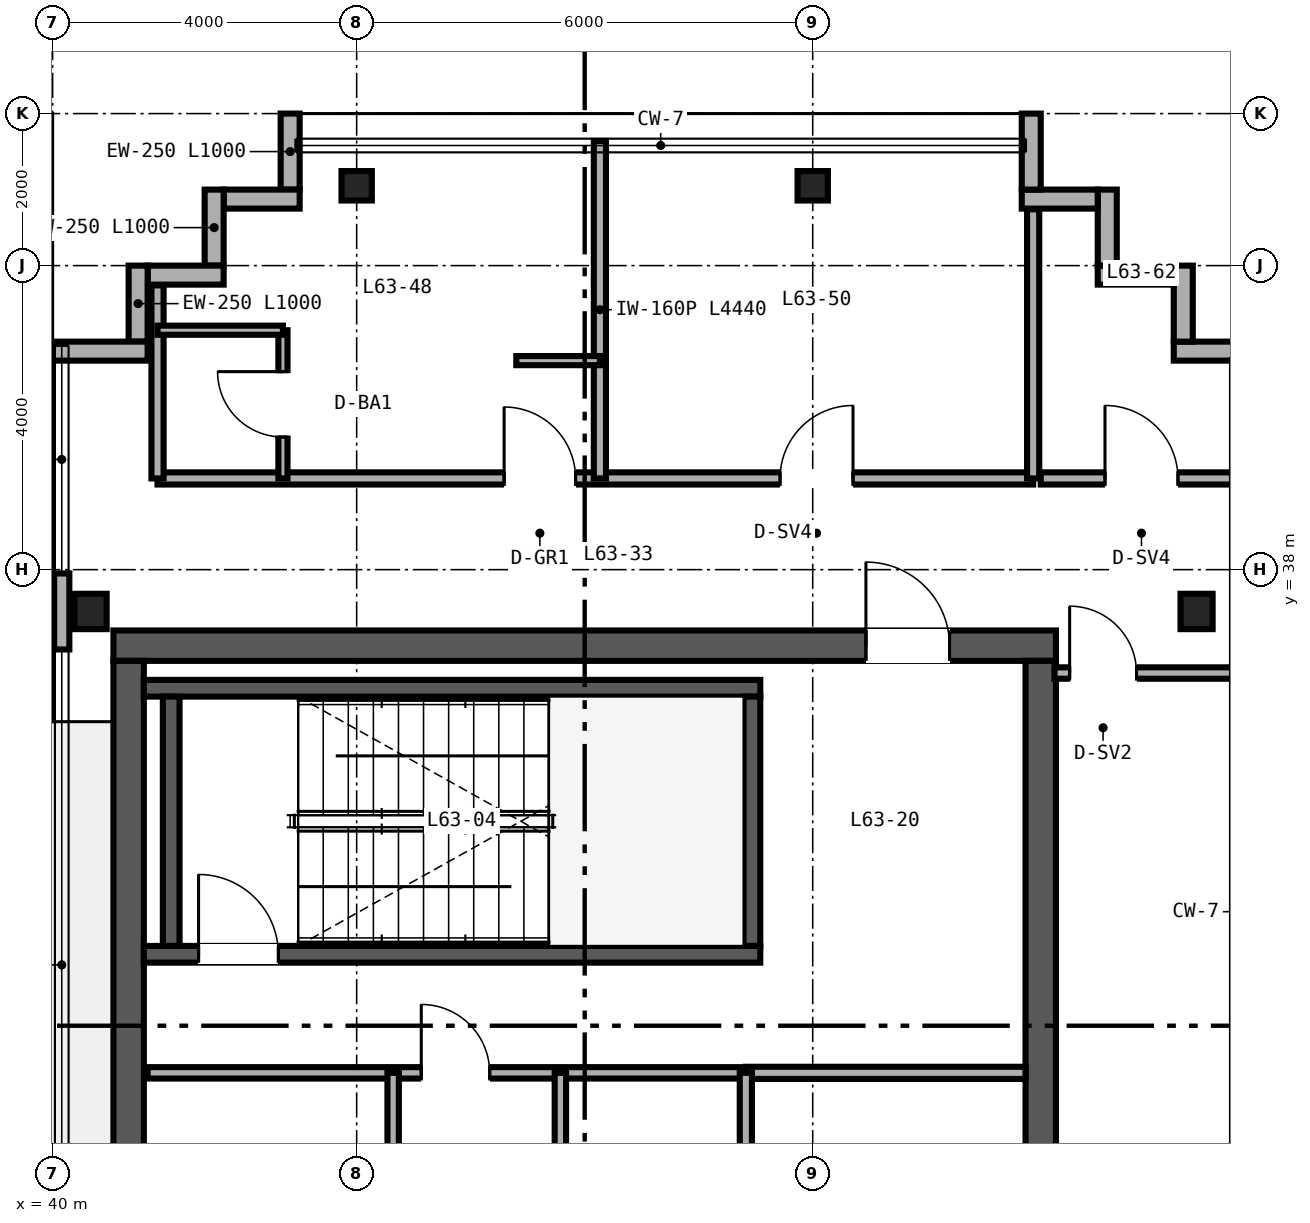
"""IFC4 building model, lengths in metres.
Left out: names, types, materials, properties, quantities, classifications, styles, units other than length and angle.
Written with IfcOpenShell. Run it as: python <this file> out.ifc"""

import sys

from ifc_helpers import new_model, si_unit, direction, frame, frame_2d, origin, origin_2d, place, context, subcontext, project, spatial, rectangle, i_section, extrude, source, transform, mapped, element, fill, save


model = new_model("IFC4")
c1 = context("Model", 3, precision=1e-05, world=origin(), true_north=direction((0.0, 1.0)))
c2 = subcontext(c1, "Body", "Model", "MODEL_VIEW")
j1 = project(units=[si_unit("LENGTHUNIT", "METRE"), si_unit("PLANEANGLEUNIT", "RADIAN")], contexts=[c1])
p1 = place(None, origin())
s1 = spatial("IfcSite", under=j1, at=p1, CompositionType="ELEMENT")
p2 = place(p1, origin())
s2 = spatial("IfcBuilding", under=s1, at=p2, CompositionType="ELEMENT")
p3 = place(p2, frame((0.0, 0.0, 250.8)))
s3 = spatial("IfcBuildingStorey", under=s2, at=p3, CompositionType="ELEMENT", Elevation=250.8)
p4 = place(p3, frame((40.8, 37.0, 0.0), z_axis=(0.0, 0.0, 1.0), x_axis=(1.0, 0.0, 0.0)))
e1 = element("IfcWall", 1, at=p4, inside=s3, PredefinedType="SHEAR", context=c2, shape_type="SweptSolid", body=[
    extrude(rectangle(XDim=12.4, YDim=0.4, at=frame_2d((6.2, 0.0))), origin(), (0.0, 0.0, 1.0), 3.38),
])
p5 = place(p4, frame((9.9, 0.0, 0.0)))
e2 = element("IfcOpeningElement", 2, at=p5, cuts=e1, PredefinedType="OPENING", context=c2, shape_type="SweptSolid", body=[
    extrude(rectangle(XDim=1.1, YDim=2.15, at=frame_2d((0.55, 1.075))), frame((0.0, 0.21, 0.0), z_axis=(0.0, -1.0, 0.0), x_axis=(1.0, 0.0, 0.0)), (0.0, 0.0, 1.0), 0.42),
])
for number, where, z_axis, x_axis in (
    (3, (41.0, 15.2, 0.0), (0.0, 0.0, 1.0), (0.0, 1.0, 0.0)),
    (4, (53.0, 15.2, 0.0), (0.0, 0.0, 1.0), (0.0, 1.0, 0.0)),
):
    element("IfcWall", number, at=place(p3, frame(where, z_axis=z_axis, x_axis=x_axis)), inside=s3, PredefinedType="SHEAR", context=c2, shape_type="SweptSolid", body=[
        extrude(rectangle(XDim=21.6, YDim=0.4, at=frame_2d((10.8, 0.0))), origin(), (0.0, 0.0, 1.0), 3.38),
    ])
p6 = place(p3, frame((41.2, 32.94, 0.0), z_axis=(0.0, 0.0, 1.0), x_axis=(1.0, 0.0, 0.0)))
e5 = element("IfcWall", 5, at=p6, inside=s3, PredefinedType="SHEAR", context=c2, shape_type="SweptSolid", body=[
    extrude(rectangle(XDim=8.11, YDim=0.22, at=frame_2d((4.055, 0.0))), origin(), (0.0, 0.0, 1.0), 3.4),
])
p7 = place(p6, frame((0.72, 0.0, 0.0)))
e6 = element("IfcOpeningElement", 6, at=p7, cuts=e5, PredefinedType="OPENING", context=c2, shape_type="SweptSolid", body=[
    extrude(rectangle(XDim=1.05, YDim=2.15, at=frame_2d((0.525, 1.075))), frame((0.0, 0.12, 0.0), z_axis=(0.0, -1.0, 0.0), x_axis=(1.0, 0.0, 0.0)), (0.0, 0.0, 1.0), 0.24),
])
p8 = place(p3, frame((41.2, 36.44, 0.0), z_axis=(0.0, 0.0, 1.0), x_axis=(1.0, 0.0, 0.0)))
e7 = element("IfcWall", 7, at=p8, inside=s3, PredefinedType="SHEAR", context=c2, shape_type="SweptSolid", body=[
    extrude(rectangle(XDim=8.11, YDim=0.22, at=frame_2d((4.055, 0.0))), origin(), (0.0, 0.0, 1.0), 3.4),
])
for number, where, z_axis, x_axis in (
    (8, (41.56, 33.05, 0.0), (0.0, 0.0, 1.0), (0.0, 1.0, 0.0)),
    (9, (49.2, 33.05, 0.0), (0.0, 0.0, 1.0), (0.0, 1.0, 0.0)),
):
    element("IfcWall", number, at=place(p3, frame(where, z_axis=z_axis, x_axis=x_axis)), inside=s3, PredefinedType="SHEAR", context=c2, shape_type="SweptSolid", body=[
        extrude(rectangle(XDim=3.28, YDim=0.22, at=frame_2d((1.64, 0.0))), origin(), (0.0, 0.0, 1.0), 3.4),
    ])
m1 = source(origin(), c2, "Body", "SweptSolid", [
    extrude(i_section(OverallWidth=0.422, OverallDepth=0.465, WebThickness=0.045, FlangeThickness=0.073, FilletRadius=0.025, at=origin_2d()), origin(), (0.0, 0.0, 1.0), 3.38),
])
for number, where, z_axis, x_axis in (
    (10, (40.5, 37.45, 0.0), (0.0, 0.0, 1.0), (1.0, 0.0, 0.0)),
    (11, (55.05, 37.45, 0.0), (0.0, 0.0, 1.0), (1.0, 0.0, 0.0)),
):
    element("IfcColumn", number, at=place(p3, frame(where, z_axis=z_axis, x_axis=x_axis)), inside=s3, PredefinedType="COLUMN", context=c2, shape_type="MappedRepresentation", body=[
        mapped(m1, transform((0.0, 0.0, 0.0), scale=1.0)),
    ])
m2 = source(origin(), c2, "Body", "SweptSolid", [
    extrude(i_section(OverallWidth=0.399, OverallDepth=0.387, WebThickness=0.021, FlangeThickness=0.033, FilletRadius=0.025, at=origin_2d()), origin(), (0.0, 0.0, 1.0), 3.38),
])
for number, where, z_axis, x_axis in (
    (12, (44.0, 43.05, 0.0), (0.0, 0.0, 1.0), (1.0, 0.0, 0.0)),
    (13, (50.0, 43.05, 0.0), (0.0, 0.0, 1.0), (1.0, 0.0, 0.0)),
):
    element("IfcColumn", number, at=place(p3, frame(where, z_axis=z_axis, x_axis=x_axis)), inside=s3, PredefinedType="COLUMN", context=c2, shape_type="MappedRepresentation", body=[
        mapped(m2, transform((0.0, 0.0, 0.0), scale=1.0)),
    ])
p9 = place(p3, frame((56.0, 40.875, 0.0), z_axis=(0.0, 0.0, 1.0), x_axis=(-1.0, 0.0, 0.0)))
e14 = element("IfcWall", 14, at=p9, inside=s3, PredefinedType="SOLIDWALL", context=c2, shape_type="SweptSolid", body=[
    extrude(rectangle(XDim=1.25, YDim=0.25, at=frame_2d((0.625, 0.0))), origin(), (0.0, 0.0, 1.0), 3.38),
])
for number, where, z_axis, x_axis in (
    (15, (54.875, 41.0, 0.0), (0.0, 0.0, 1.0), (0.0, 1.0, 0.0)),
    (16, (54.75, 41.875, 0.0), (0.0, 0.0, 1.0), (-1.0, 0.0, 0.0)),
    (17, (53.875, 42.0, 0.0), (0.0, 0.0, 1.0), (0.0, 1.0, 0.0)),
    (18, (53.75, 42.875, 0.0), (0.0, 0.0, 1.0), (-1.0, 0.0, 0.0)),
    (19, (52.875, 43.0, 0.0), (0.0, 0.0, 1.0), (0.0, 1.0, 0.0)),
    (20, (43.125, 44.0, 0.0), (0.0, 0.0, 1.0), (0.0, -1.0, 0.0)),
    (21, (43.25, 42.875, 0.0), (0.0, 0.0, 1.0), (-1.0, 0.0, 0.0)),
    (22, (42.125, 43.0, 0.0), (0.0, 0.0, 1.0), (0.0, -1.0, 0.0)),
    (23, (42.25, 41.875, 0.0), (0.0, 0.0, 1.0), (-1.0, 0.0, 0.0)),
    (24, (41.125, 42.0, 0.0), (0.0, 0.0, 1.0), (0.0, -1.0, 0.0)),
):
    element("IfcWall", number, at=place(p3, frame(where, z_axis=z_axis, x_axis=x_axis)), inside=s3, PredefinedType="SOLIDWALL", context=c2, shape_type="SweptSolid", body=[
        extrude(rectangle(XDim=1.0, YDim=0.25, at=frame_2d((0.5, 0.0))), origin(), (0.0, 0.0, 1.0), 3.38),
    ])
p10 = place(p3, frame((41.25, 40.875, 0.0), z_axis=(0.0, 0.0, 1.0), x_axis=(-1.0, 0.0, 0.0)))
e25 = element("IfcWall", 25, at=p10, inside=s3, PredefinedType="SOLIDWALL", context=c2, shape_type="SweptSolid", body=[
    extrude(rectangle(XDim=1.25, YDim=0.25, at=frame_2d((0.625, 0.0))), origin(), (0.0, 0.0, 1.0), 3.38),
])
p11 = place(p3, frame((40.12, 36.95, 0.0), z_axis=(0.0, 0.0, 1.0), x_axis=(0.0, 1.0, 0.0)))
e26 = element("IfcWall", 26, at=p11, inside=s3, PredefinedType="PARAPET", context=c2, shape_type="SweptSolid", body=[
    extrude(rectangle(XDim=1.0, YDim=0.2, at=frame_2d((0.5, 0.0))), origin(), (0.0, 0.0, 1.0), 3.38),
])
p12 = place(p3, frame((41.25, 31.38, 0.0), z_axis=(0.0, 0.0, 1.0), x_axis=(1.0, 0.0, 0.0)))
e27 = element("IfcWall", 27, at=p12, inside=s3, PredefinedType="PARTITIONING", context=c2, shape_type="SweptSolid", body=[
    extrude(rectangle(XDim=7.87, YDim=0.15, at=frame_2d((3.935, 0.0))), origin(), (0.0, 0.0, 1.0), 2.48),
])
p13 = place(p12, frame((3.6, 0.0, 0.0)))
e28 = element("IfcOpeningElement", 28, at=p13, cuts=e27, PredefinedType="OPENING", context=c2, shape_type="SweptSolid", body=[
    extrude(rectangle(XDim=0.9, YDim=2.15, at=frame_2d((0.45, 1.075))), frame((0.0, 0.085, 0.0), z_axis=(0.0, -1.0, 0.0), x_axis=(1.0, 0.0, 0.0)), (0.0, 0.0, 1.0), 0.17),
])
p14 = place(p3, frame((46.68, 15.25, 0.0), z_axis=(0.0, 0.0, 1.0), x_axis=(0.0, 1.0, 0.0)))
e29 = element("IfcWall", 29, at=p14, inside=s3, PredefinedType="PARTITIONING", context=c2, shape_type="SweptSolid", body=[
    extrude(rectangle(XDim=16.13, YDim=0.15, at=frame_2d((8.065, 0.0))), origin(), (0.0, 0.0, 1.0), 2.453),
])
p15 = place(p14, frame((2.0, 0.0, 0.0)))
e30 = element("IfcOpeningElement", 30, at=p15, cuts=e29, PredefinedType="OPENING", context=c2, shape_type="SweptSolid", body=[
    extrude(rectangle(XDim=0.84, YDim=2.1, at=frame_2d((0.42, 1.05))), frame((0.0, 0.085, 0.0), z_axis=(0.0, -1.0, 0.0), x_axis=(1.0, 0.0, 0.0)), (0.0, 0.0, 1.0), 0.17),
])
p16 = place(p14, frame((7.2, 0.0, 0.0)))
e31 = element("IfcOpeningElement", 31, at=p16, cuts=e29, PredefinedType="OPENING", context=c2, shape_type="SweptSolid", body=[
    extrude(rectangle(XDim=0.84, YDim=2.1, at=frame_2d((0.42, 1.05))), frame((0.0, 0.085, 0.0), z_axis=(0.0, -1.0, 0.0), x_axis=(1.0, 0.0, 0.0)), (0.0, 0.0, 1.0), 0.17),
])
p17 = place(p14, frame((12.6, 0.0, 0.0)))
e32 = element("IfcOpeningElement", 32, at=p17, cuts=e29, PredefinedType="OPENING", context=c2, shape_type="SweptSolid", body=[
    extrude(rectangle(XDim=0.84, YDim=2.1, at=frame_2d((0.42, 1.05))), frame((0.0, 0.085, 0.0), z_axis=(0.0, -1.0, 0.0), x_axis=(1.0, 0.0, 0.0)), (0.0, 0.0, 1.0), 0.17),
])
p18 = place(p3, frame((49.12, 31.38, 0.0), z_axis=(0.0, 0.0, 1.0), x_axis=(1.0, 0.0, 0.0)))
e33 = element("IfcWall", 33, at=p18, inside=s3, PredefinedType="PARTITIONING", context=c2, shape_type="SweptSolid", body=[
    extrude(rectangle(XDim=3.68, YDim=0.16, at=frame_2d((1.84, 0.0))), origin(), (0.0, 0.0, 1.0), 2.48),
])
p19 = place(p3, frame((49.12, 15.25, 0.0), z_axis=(0.0, 0.0, 1.0), x_axis=(0.0, 1.0, 0.0)))
e34 = element("IfcWall", 34, at=p19, inside=s3, PredefinedType="PARTITIONING", context=c2, shape_type="SweptSolid", body=[
    extrude(rectangle(XDim=16.13, YDim=0.16, at=frame_2d((8.065, 0.0))), origin(), (0.0, 0.0, 1.0), 2.453),
])
p20 = place(p19, frame((3.8, 0.0, 0.0)))
e35 = element("IfcOpeningElement", 35, at=p20, cuts=e34, PredefinedType="OPENING", context=c2, shape_type="SweptSolid", body=[
    extrude(rectangle(XDim=0.92, YDim=2.15, at=frame_2d((0.46, 1.075))), frame((0.0, 0.09, 0.0), z_axis=(0.0, -1.0, 0.0), x_axis=(1.0, 0.0, 0.0)), (0.0, 0.0, 1.0), 0.18),
])
p21 = place(p19, frame((11.8, 0.0, 0.0)))
e36 = element("IfcOpeningElement", 36, at=p21, cuts=e34, PredefinedType="OPENING", context=c2, shape_type="SweptSolid", body=[
    extrude(rectangle(XDim=0.9, YDim=2.15, at=frame_2d((0.45, 1.075))), frame((0.0, 0.09, 0.0), z_axis=(0.0, -1.0, 0.0), x_axis=(1.0, 0.0, 0.0)), (0.0, 0.0, 1.0), 0.18),
])
p22 = place(p3, frame((44.48, 15.25, 0.0), z_axis=(0.0, 0.0, 1.0), x_axis=(0.0, 1.0, 0.0)))
e37 = element("IfcWall", 37, at=p22, inside=s3, PredefinedType="PARTITIONING", context=c2, shape_type="SweptSolid", body=[
    extrude(rectangle(XDim=16.13, YDim=0.15, at=frame_2d((8.065, 0.0))), origin(), (0.0, 0.0, 1.0), 2.453),
])
p23 = place(p22, frame((1.6, 0.0, 0.0)))
e38 = element("IfcOpeningElement", 38, at=p23, cuts=e37, PredefinedType="OPENING", context=c2, shape_type="SweptSolid", body=[
    extrude(rectangle(XDim=0.84, YDim=2.1, at=frame_2d((0.42, 1.05))), frame((0.0, 0.085, 0.0), z_axis=(0.0, -1.0, 0.0), x_axis=(1.0, 0.0, 0.0)), (0.0, 0.0, 1.0), 0.17),
])
p24 = place(p22, frame((5.85, 0.0, 0.0)))
e39 = element("IfcOpeningElement", 39, at=p24, cuts=e37, PredefinedType="OPENING", context=c2, shape_type="SweptSolid", body=[
    extrude(rectangle(XDim=0.84, YDim=2.1, at=frame_2d((0.42, 1.05))), frame((0.0, 0.085, 0.0), z_axis=(0.0, -1.0, 0.0), x_axis=(1.0, 0.0, 0.0)), (0.0, 0.0, 1.0), 0.17),
])
p25 = place(p22, frame((10.05, 0.0, 0.0)))
e40 = element("IfcOpeningElement", 40, at=p25, cuts=e37, PredefinedType="OPENING", context=c2, shape_type="SweptSolid", body=[
    extrude(rectangle(XDim=0.84, YDim=2.1, at=frame_2d((0.42, 1.05))), frame((0.0, 0.085, 0.0), z_axis=(0.0, -1.0, 0.0), x_axis=(1.0, 0.0, 0.0)), (0.0, 0.0, 1.0), 0.17),
])
p26 = place(p3, frame((41.38, 39.2, 0.0), z_axis=(0.0, 0.0, 1.0), x_axis=(1.0, 0.0, 0.0)))
e41 = element("IfcWall", 41, at=p26, inside=s3, PredefinedType="PARTITIONING", context=c2, shape_type="SweptSolid", body=[
    extrude(rectangle(XDim=11.52, YDim=0.16, at=frame_2d((5.76, 0.0))), origin(), (0.0, 0.0, 1.0), 3.38),
])
p27 = place(p26, frame((4.56, 0.0, 0.0)))
e42 = element("IfcOpeningElement", 42, at=p27, cuts=e41, PredefinedType="OPENING", context=c2, shape_type="SweptSolid", body=[
    extrude(rectangle(XDim=0.94, YDim=2.15, at=frame_2d((0.47, 1.075))), frame((0.0, 0.09, 0.0), z_axis=(0.0, -1.0, 0.0), x_axis=(1.0, 0.0, 0.0)), (0.0, 0.0, 1.0), 0.18),
])
p28 = place(p26, frame((8.19, 0.0, 0.0)))
e43 = element("IfcOpeningElement", 43, at=p28, cuts=e41, PredefinedType="OPENING", context=c2, shape_type="SweptSolid", body=[
    extrude(rectangle(XDim=0.96, YDim=2.15, at=frame_2d((0.48, 1.075))), frame((0.0, 0.09, 0.0), z_axis=(0.0, -1.0, 0.0), x_axis=(1.0, 0.0, 0.0)), (0.0, 0.0, 1.0), 0.18),
])
p29 = place(p3, frame((41.38, 39.2, 0.0), z_axis=(0.0, 0.0, 1.0), x_axis=(0.0, 1.0, 0.0)))
e44 = element("IfcWall", 44, at=p29, inside=s3, PredefinedType="PARTITIONING", context=c2, shape_type="SweptSolid", body=[
    extrude(rectangle(XDim=2.54, YDim=0.16, at=frame_2d((1.27, 0.0))), origin(), (0.0, 0.0, 1.0), 3.38),
])
p30 = place(p3, frame((52.9, 39.2, 0.0), z_axis=(0.0, 0.0, 1.0), x_axis=(0.0, 1.0, 0.0)))
e45 = element("IfcWall", 45, at=p30, inside=s3, PredefinedType="PARTITIONING", context=c2, shape_type="SweptSolid", body=[
    extrude(rectangle(XDim=3.54, YDim=0.16, at=frame_2d((1.77, 0.0))), origin(), (0.0, 0.0, 1.0), 3.38),
])
p31 = place(p3, frame((47.2, 39.2, 0.0), z_axis=(0.0, 0.0, 1.0), x_axis=(0.0, 1.0, 0.0)))
e46 = element("IfcWall", 46, at=p31, inside=s3, PredefinedType="PARTITIONING", context=c2, shape_type="SweptSolid", body=[
    extrude(rectangle(XDim=4.44, YDim=0.16, at=frame_2d((2.22, 0.0))), origin(), (0.0, 0.0, 1.0), 2.687),
])
p32 = place(p3, frame((43.03, 39.2, 0.0), z_axis=(0.0, 0.0, 1.0), x_axis=(0.0, 1.0, 0.0)))
e47 = element("IfcWall", 47, at=p32, inside=s3, PredefinedType="PARTITIONING", context=c2, shape_type="SweptSolid", body=[
    extrude(rectangle(XDim=1.95, YDim=0.12, at=frame_2d((0.975, 0.0))), origin(), (0.0, 0.0, 1.0), 3.38),
])
p33 = place(p32, frame((0.545, 0.0, 0.0)))
e48 = element("IfcOpeningElement", 48, at=p33, cuts=e47, PredefinedType="OPENING", context=c2, shape_type="SweptSolid", body=[
    extrude(rectangle(XDim=0.86, YDim=2.1, at=frame_2d((0.43, 1.05))), frame((0.0, 0.07, 0.0), z_axis=(0.0, -1.0, 0.0), x_axis=(1.0, 0.0, 0.0)), (0.0, 0.0, 1.0), 0.14),
])
p34 = place(p3, frame((41.38, 41.15, 0.0), z_axis=(0.0, 0.0, 1.0), x_axis=(1.0, 0.0, 0.0)))
e49 = element("IfcWall", 49, at=p34, inside=s3, PredefinedType="PARTITIONING", context=c2, shape_type="SweptSolid", body=[
    extrude(rectangle(XDim=1.65, YDim=0.12, at=frame_2d((0.825, 0.0))), origin(), (0.0, 0.0, 1.0), 3.38),
])
p35 = place(p3, frame((46.1, 40.75, 0.0), z_axis=(0.0, 0.0, 1.0), x_axis=(1.0, 0.0, 0.0)))
e50 = element("IfcWall", 50, at=p35, inside=s3, PredefinedType="PARTITIONING", context=c2, shape_type="SweptSolid", body=[
    extrude(rectangle(XDim=1.1, YDim=0.12, at=frame_2d((0.55, 0.0))), origin(), (0.0, 0.0, 1.0), 3.38),
])
p36 = place(p3, frame((53.18, 36.64, 0.0), z_axis=(0.0, 0.0, 1.0), x_axis=(1.0, 0.0, 0.0)))
e51 = element("IfcWall", 51, at=p36, inside=s3, PredefinedType="PARTITIONING", context=c2, shape_type="SweptSolid", body=[
    extrude(rectangle(XDim=2.66, YDim=0.15, at=frame_2d((1.33, 0.0))), origin(), (0.0, 0.0, 1.0), 2.763),
])
p37 = place(p36, frame((0.2, 0.0, 0.0)))
e52 = element("IfcOpeningElement", 52, at=p37, cuts=e51, PredefinedType="OPENING", context=c2, shape_type="SweptSolid", body=[
    extrude(rectangle(XDim=0.88, YDim=2.15, at=frame_2d((0.44, 1.075))), frame((0.0, 0.085, 0.0), z_axis=(0.0, -1.0, 0.0), x_axis=(1.0, 0.0, 0.0)), (0.0, 0.0, 1.0), 0.17),
])
p38 = place(p3, frame((53.0, 39.2, 0.0), z_axis=(0.0, 0.0, 1.0), x_axis=(1.0, 0.0, 0.0)))
e53 = element("IfcWall", 53, at=p38, inside=s3, PredefinedType="PARTITIONING", context=c2, shape_type="SweptSolid", body=[
    extrude(rectangle(XDim=2.65, YDim=0.16, at=frame_2d((1.325, 0.0))), origin(), (0.0, 0.0, 1.0), 3.38),
])
p39 = place(p38, frame((0.845, 0.0, 0.0)))
e54 = element("IfcOpeningElement", 54, at=p39, cuts=e53, PredefinedType="OPENING", context=c2, shape_type="SweptSolid", body=[
    extrude(rectangle(XDim=0.96, YDim=2.15, at=frame_2d((0.48, 1.075))), frame((0.0, 0.09, 0.0), z_axis=(0.0, -1.0, 0.0), x_axis=(1.0, 0.0, 0.0)), (0.0, 0.0, 1.0), 0.18),
])
m3 = source(origin(), c2, "Body", "SweptSolid", [
    extrude(rectangle(XDim=1.05, YDim=2.15, at=frame_2d((0.525, 1.075))), frame((0.0, 0.025, 0.0), z_axis=(0.0, -1.0, 0.0), x_axis=(1.0, 0.0, 0.0)), (0.0, 0.0, 1.0), 0.05),
])
p40 = place(p7, origin())
e55 = element("IfcDoor", 55, at=p40, inside=s3, OperationType="SINGLE_SWING_LEFT", PredefinedType="DOOR", context=c2, shape_type="MappedRepresentation", body=[
    mapped(m3, transform((0.0, 0.0, 0.0), scale=1.0)),
])
fill(e6, e55)
m4 = source(origin(), c2, "Body", "SweptSolid", [
    extrude(rectangle(XDim=0.9, YDim=2.15, at=frame_2d((0.45, 1.075))), frame((0.0, 0.025, 0.0), z_axis=(0.0, -1.0, 0.0), x_axis=(1.0, 0.0, 0.0)), (0.0, 0.0, 1.0), 0.05),
])
p41 = place(p13, origin())
e56 = element("IfcDoor", 56, at=p41, inside=s3, OperationType="SINGLE_SWING_LEFT", PredefinedType="DOOR", context=c2, shape_type="MappedRepresentation", body=[
    mapped(m4, transform((0.0, 0.0, 0.0), scale=1.0)),
])
fill(e28, e56)
m5 = source(origin(), c2, "Body", "SweptSolid", [
    extrude(rectangle(XDim=1.1, YDim=2.15, at=frame_2d((0.55, 1.075))), frame((0.0, 0.025, 0.0), z_axis=(0.0, -1.0, 0.0), x_axis=(1.0, 0.0, 0.0)), (0.0, 0.0, 1.0), 0.05),
])
p42 = place(p5, origin())
e57 = element("IfcDoor", 57, at=p42, inside=s3, OperationType="SINGLE_SWING_LEFT", PredefinedType="DOOR", context=c2, shape_type="MappedRepresentation", body=[
    mapped(m5, transform((0.0, 0.0, 0.0), scale=1.0)),
])
fill(e2, e57)
m6 = source(origin(), c2, "Body", "SweptSolid", [
    extrude(rectangle(XDim=0.86, YDim=2.1, at=frame_2d((0.43, 1.05))), frame((0.0, 0.025, 0.0), z_axis=(0.0, -1.0, 0.0), x_axis=(1.0, 0.0, 0.0)), (0.0, 0.0, 1.0), 0.05),
])
p43 = place(p33, origin())
e58 = element("IfcDoor", 58, at=p43, inside=s3, OperationType="SINGLE_SWING_RIGHT", PredefinedType="DOOR", context=c2, shape_type="MappedRepresentation", body=[
    mapped(m6, transform((0.0, 0.0, 0.0), scale=1.0)),
])
fill(e48, e58)
m7 = source(origin(), c2, "Body", "SweptSolid", [
    extrude(rectangle(XDim=0.94, YDim=2.15, at=frame_2d((0.47, 1.075))), frame((0.0, 0.025, 0.0), z_axis=(0.0, -1.0, 0.0), x_axis=(1.0, 0.0, 0.0)), (0.0, 0.0, 1.0), 0.05),
])
p44 = place(p27, origin())
e59 = element("IfcDoor", 59, at=p44, inside=s3, OperationType="SINGLE_SWING_LEFT", PredefinedType="DOOR", context=c2, shape_type="MappedRepresentation", body=[
    mapped(m7, transform((0.0, 0.0, 0.0), scale=1.0)),
])
fill(e42, e59)
m8 = source(origin(), c2, "Body", "SweptSolid", [
    extrude(rectangle(XDim=0.96, YDim=2.15, at=frame_2d((0.48, 1.075))), frame((0.0, 0.025, 0.0), z_axis=(0.0, -1.0, 0.0), x_axis=(1.0, 0.0, 0.0)), (0.0, 0.0, 1.0), 0.05),
])
p45 = place(p28, origin())
e60 = element("IfcDoor", 60, at=p45, inside=s3, OperationType="SINGLE_SWING_RIGHT", PredefinedType="DOOR", context=c2, shape_type="MappedRepresentation", body=[
    mapped(m8, transform((0.0, 0.0, 0.0), scale=1.0)),
])
fill(e43, e60)
m9 = source(origin(), c2, "Body", "SweptSolid", [
    extrude(rectangle(XDim=0.88, YDim=2.15, at=frame_2d((0.44, 1.075))), frame((0.0, 0.025, 0.0), z_axis=(0.0, -1.0, 0.0), x_axis=(1.0, 0.0, 0.0)), (0.0, 0.0, 1.0), 0.05),
])
p46 = place(p37, origin())
e61 = element("IfcDoor", 61, at=p46, inside=s3, OperationType="SINGLE_SWING_LEFT", PredefinedType="DOOR", context=c2, shape_type="MappedRepresentation", body=[
    mapped(m9, transform((0.0, 0.0, 0.0), scale=1.0)),
])
fill(e52, e61)
p47 = place(p39, origin())
e62 = element("IfcDoor", 62, at=p47, inside=s3, OperationType="SINGLE_SWING_LEFT", PredefinedType="DOOR", context=c2, shape_type="MappedRepresentation", body=[
    mapped(m8, transform((0.0, 0.0, 0.0), scale=1.0)),
])
fill(e54, e62)
save(model, sys.argv[1])
